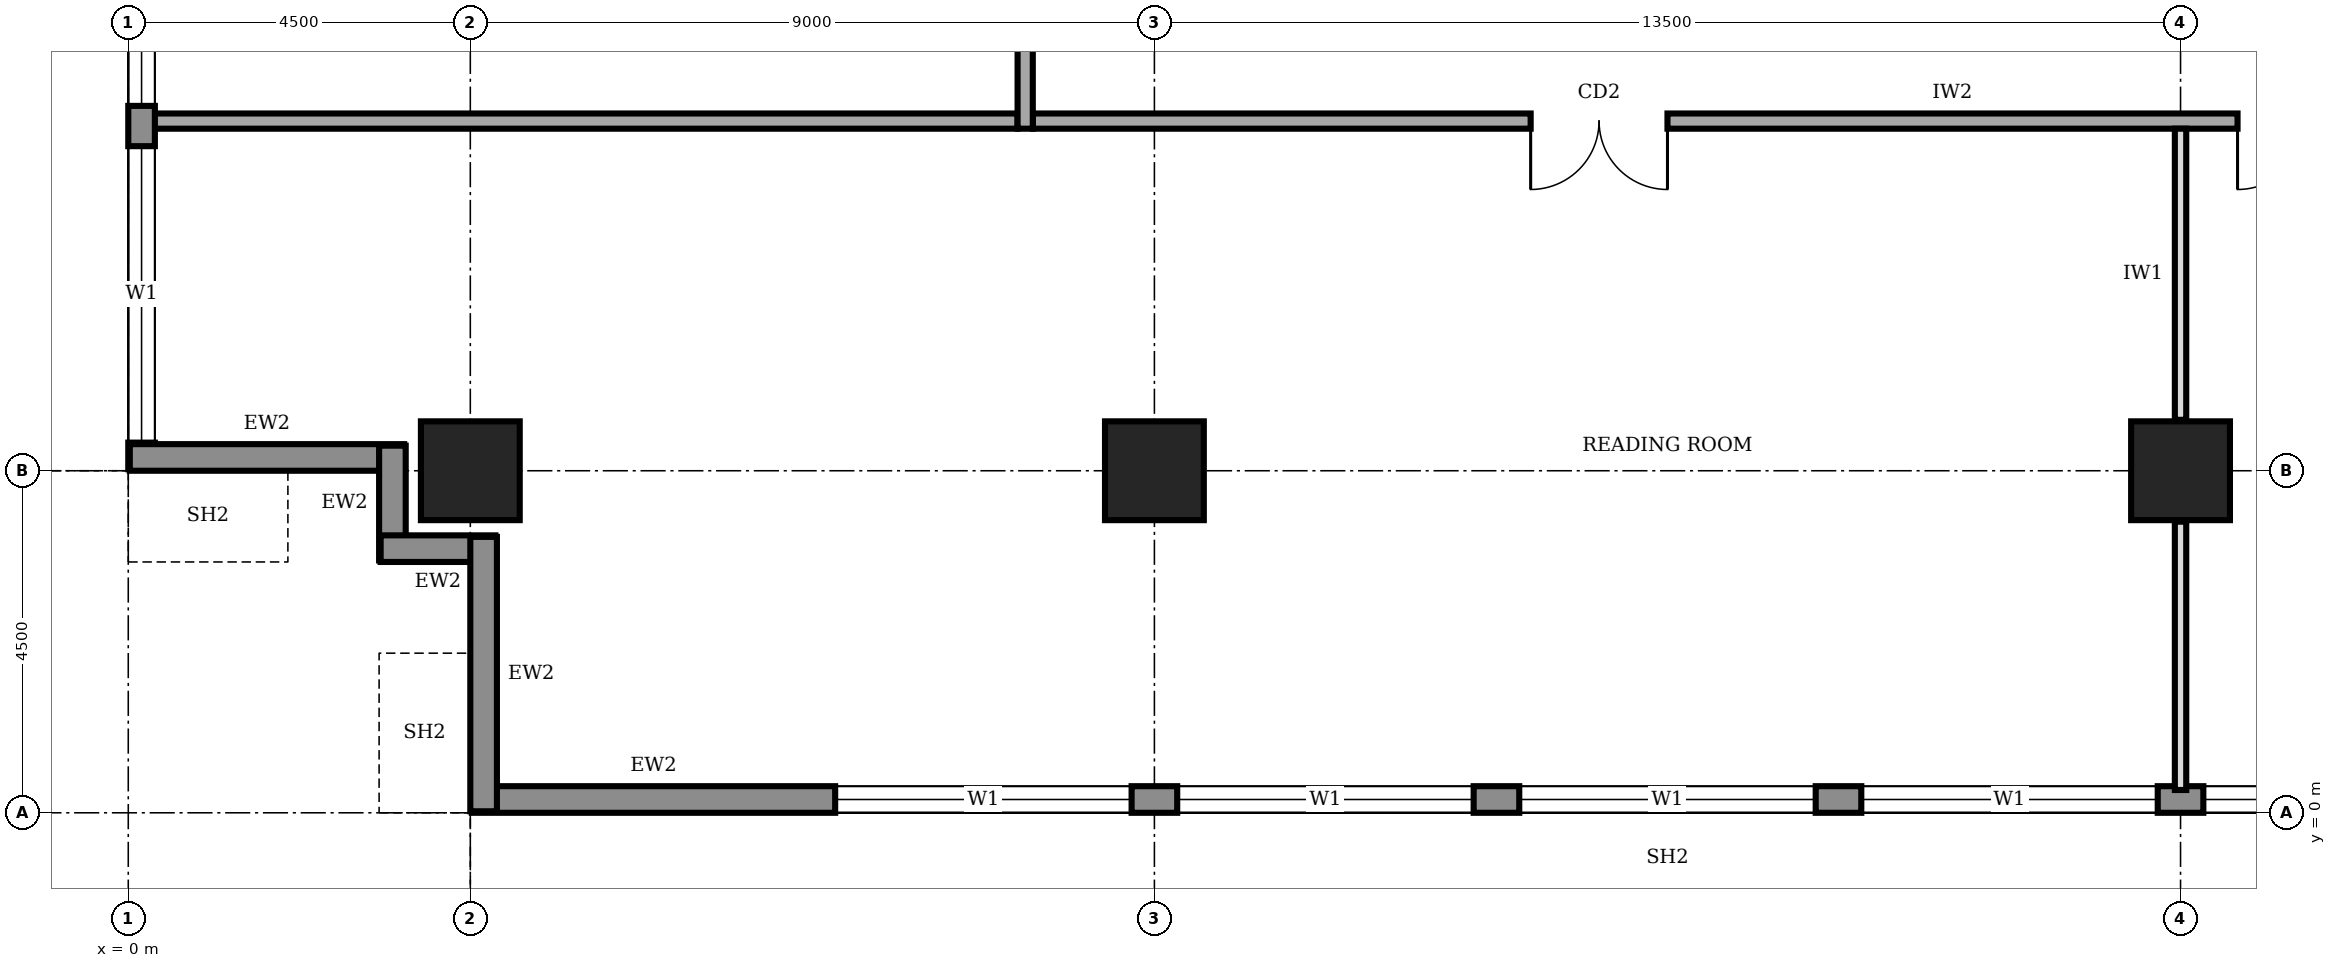
"""IFC4 building model, lengths in metres.
Left out: names, types, materials, properties, quantities, classifications, styles, units other than length and angle.
Written with IfcOpenShell. Run it as: python <this file> out.ifc"""

import sys

from ifc_helpers import new_model, si_unit, direction, frame, frame_2d, origin, origin_2d, place, context, subcontext, project, spatial, rectangle, extrude, element, fill, save


model = new_model("IFC4")
c1 = context("Model", 3, precision=1e-05, world=origin(), true_north=direction((0.0, 1.0)))
c2 = subcontext(c1, "Body", "Model", "MODEL_VIEW")
j1 = project(units=[si_unit("LENGTHUNIT", "METRE"), si_unit("PLANEANGLEUNIT", "RADIAN")], contexts=[c1])
p1 = place(None, origin())
s1 = spatial("IfcSite", under=j1, at=p1, CompositionType="ELEMENT")
p2 = place(p1, origin())
s2 = spatial("IfcBuilding", under=s1, at=p2, CompositionType="ELEMENT")
p3 = place(p2, frame((0.0, 0.0, 285.0)))
s3 = spatial("IfcBuildingStorey", under=s2, at=p3, CompositionType="ELEMENT", Elevation=285.0)
for number, where, z_axis, x_axis in (
    (1, (4.5, 4.5, 0.0), (0.0, 0.0, 1.0), (1.0, 0.0, 0.0)),
    (2, (13.5, 4.5, 0.0), (0.0, 0.0, 1.0), (1.0, 0.0, 0.0)),
    (3, (27.0, 4.5, 0.0), (0.0, 0.0, 1.0), (1.0, 0.0, 0.0)),
):
    element("IfcColumn", number, at=place(p3, frame(where, z_axis=z_axis, x_axis=x_axis)), inside=s3, PredefinedType="COLUMN", context=c2, shape_type="SweptSolid", body=[
        extrude(rectangle(XDim=1.3, YDim=1.3, at=origin_2d()), origin(), (0.0, 0.0, 1.0), 4.0),
    ])
p4 = place(p3, frame((4.52, 0.175, 0.0), z_axis=(0.0, 0.0, 1.0), x_axis=(1.0, 0.0, 0.0)))
e4 = element("IfcWall", 4, at=p4, inside=s3, PredefinedType="STANDARD", context=c2, shape_type="SweptSolid", body=[
    extrude(rectangle(XDim=31.46, YDim=0.35, at=frame_2d((15.73, 0.0))), origin(), (0.0, 0.0, 1.0), 3.75),
])
p5 = place(p4, frame((4.78, 0.0, 0.9)))
e5 = element("IfcOpeningElement", 5, at=p5, cuts=e4, PredefinedType="OPENING", context=c2, shape_type="SweptSolid", body=[
    extrude(rectangle(XDim=3.9, YDim=2.2, at=frame_2d((1.95, 1.1))), frame((0.0, 0.185, 0.0), z_axis=(0.0, -1.0, 0.0), x_axis=(1.0, 0.0, 0.0)), (0.0, 0.0, 1.0), 0.37),
])
p6 = place(p4, frame((9.28, 0.0, 0.9)))
e6 = element("IfcOpeningElement", 6, at=p6, cuts=e4, PredefinedType="OPENING", context=c2, shape_type="SweptSolid", body=[
    extrude(rectangle(XDim=3.9, YDim=2.2, at=frame_2d((1.95, 1.1))), frame((0.0, 0.185, 0.0), z_axis=(0.0, -1.0, 0.0), x_axis=(1.0, 0.0, 0.0)), (0.0, 0.0, 1.0), 0.37),
])
p7 = place(p4, frame((13.78, 0.0, 0.9)))
e7 = element("IfcOpeningElement", 7, at=p7, cuts=e4, PredefinedType="OPENING", context=c2, shape_type="SweptSolid", body=[
    extrude(rectangle(XDim=3.9, YDim=2.2, at=frame_2d((1.95, 1.1))), frame((0.0, 0.185, 0.0), z_axis=(0.0, -1.0, 0.0), x_axis=(1.0, 0.0, 0.0)), (0.0, 0.0, 1.0), 0.37),
])
p8 = place(p4, frame((18.28, 0.0, 0.9)))
e8 = element("IfcOpeningElement", 8, at=p8, cuts=e4, PredefinedType="OPENING", context=c2, shape_type="SweptSolid", body=[
    extrude(rectangle(XDim=3.9, YDim=2.2, at=frame_2d((1.95, 1.1))), frame((0.0, 0.185, 0.0), z_axis=(0.0, -1.0, 0.0), x_axis=(1.0, 0.0, 0.0)), (0.0, 0.0, 1.0), 0.37),
])
p9 = place(p4, frame((22.78, 0.0, 0.9)))
e9 = element("IfcOpeningElement", 9, at=p9, cuts=e4, PredefinedType="OPENING", context=c2, shape_type="SweptSolid", body=[
    extrude(rectangle(XDim=3.9, YDim=2.2, at=frame_2d((1.95, 1.1))), frame((0.0, 0.185, 0.0), z_axis=(0.0, -1.0, 0.0), x_axis=(1.0, 0.0, 0.0)), (0.0, 0.0, 1.0), 0.37),
])
p10 = place(p4, frame((27.21, 0.0, 0.9)))
e10 = element("IfcOpeningElement", 10, at=p10, cuts=e4, PredefinedType="OPENING", context=c2, shape_type="SweptSolid", body=[
    extrude(rectangle(XDim=3.9, YDim=2.2, at=frame_2d((1.95, 1.1))), frame((0.0, 0.185, 0.0), z_axis=(0.0, -1.0, 0.0), x_axis=(1.0, 0.0, 0.0)), (0.0, 0.0, 1.0), 0.37),
])
p11 = place(p3, frame((0.175, 35.98, 0.0), z_axis=(0.0, 0.0, 1.0), x_axis=(0.0, -1.0, 0.0)))
e11 = element("IfcWall", 11, at=p11, inside=s3, PredefinedType="STANDARD", context=c2, shape_type="SweptSolid", body=[
    extrude(rectangle(XDim=31.46, YDim=0.35, at=frame_2d((15.73, 0.0))), origin(), (0.0, 0.0, 1.0), 3.75),
])
p12 = place(p11, frame((27.21, 0.0, 0.9)))
e12 = element("IfcOpeningElement", 12, at=p12, cuts=e11, PredefinedType="OPENING", context=c2, shape_type="SweptSolid", body=[
    extrude(rectangle(XDim=3.9, YDim=2.2, at=frame_2d((1.95, 1.1))), frame((0.0, 0.185, 0.0), z_axis=(0.0, -1.0, 0.0), x_axis=(1.0, 0.0, 0.0)), (0.0, 0.0, 1.0), 0.37),
])
p13 = place(p11, frame((22.78, 0.0, 0.9)))
e13 = element("IfcOpeningElement", 13, at=p13, cuts=e11, PredefinedType="OPENING", context=c2, shape_type="SweptSolid", body=[
    extrude(rectangle(XDim=3.9, YDim=2.2, at=frame_2d((1.95, 1.1))), frame((0.0, 0.185, 0.0), z_axis=(0.0, -1.0, 0.0), x_axis=(1.0, 0.0, 0.0)), (0.0, 0.0, 1.0), 0.37),
])
p14 = place(p11, frame((18.28, 0.0, 0.9)))
e14 = element("IfcOpeningElement", 14, at=p14, cuts=e11, PredefinedType="OPENING", context=c2, shape_type="SweptSolid", body=[
    extrude(rectangle(XDim=3.9, YDim=2.2, at=frame_2d((1.95, 1.1))), frame((0.0, 0.185, 0.0), z_axis=(0.0, -1.0, 0.0), x_axis=(1.0, 0.0, 0.0)), (0.0, 0.0, 1.0), 0.37),
])
p15 = place(p11, frame((13.78, 0.0, 0.9)))
e15 = element("IfcOpeningElement", 15, at=p15, cuts=e11, PredefinedType="OPENING", context=c2, shape_type="SweptSolid", body=[
    extrude(rectangle(XDim=3.9, YDim=2.2, at=frame_2d((1.95, 1.1))), frame((0.0, 0.185, 0.0), z_axis=(0.0, -1.0, 0.0), x_axis=(1.0, 0.0, 0.0)), (0.0, 0.0, 1.0), 0.37),
])
p16 = place(p11, frame((9.28, 0.0, 0.9)))
e16 = element("IfcOpeningElement", 16, at=p16, cuts=e11, PredefinedType="OPENING", context=c2, shape_type="SweptSolid", body=[
    extrude(rectangle(XDim=3.9, YDim=2.2, at=frame_2d((1.95, 1.1))), frame((0.0, 0.185, 0.0), z_axis=(0.0, -1.0, 0.0), x_axis=(1.0, 0.0, 0.0)), (0.0, 0.0, 1.0), 0.37),
])
p17 = place(p11, frame((4.78, 0.0, 0.9)))
e17 = element("IfcOpeningElement", 17, at=p17, cuts=e11, PredefinedType="OPENING", context=c2, shape_type="SweptSolid", body=[
    extrude(rectangle(XDim=3.9, YDim=2.2, at=frame_2d((1.95, 1.1))), frame((0.0, 0.185, 0.0), z_axis=(0.0, -1.0, 0.0), x_axis=(1.0, 0.0, 0.0)), (0.0, 0.0, 1.0), 0.37),
])
p18 = place(p3, frame((0.02, 4.675, 0.0), z_axis=(0.0, 0.0, 1.0), x_axis=(1.0, 0.0, 0.0)))
e18 = element("IfcWall", 18, at=p18, inside=s3, PredefinedType="STANDARD", context=c2, shape_type="SweptSolid", body=[
    extrude(rectangle(XDim=3.61, YDim=0.35, at=frame_2d((1.805, 0.0))), origin(), (0.0, 0.0, 1.0), 2.65),
])
for number, where, z_axis, x_axis in (
    (19, (3.475, 4.83, 0.0), (0.0, 0.0, 1.0), (0.0, -1.0, 0.0)),
    (20, (3.32, 3.475, 0.0), (0.0, 0.0, 1.0), (1.0, 0.0, 0.0)),
):
    element("IfcWall", number, at=place(p3, frame(where, z_axis=z_axis, x_axis=x_axis)), inside=s3, PredefinedType="STANDARD", context=c2, shape_type="SweptSolid", body=[
        extrude(rectangle(XDim=1.51, YDim=0.35, at=frame_2d((0.755, 0.0))), origin(), (0.0, 0.0, 1.0), 3.75),
    ])
p19 = place(p3, frame((4.675, 3.63, 0.0), z_axis=(0.0, 0.0, 1.0), x_axis=(0.0, -1.0, 0.0)))
e21 = element("IfcWall", 21, at=p19, inside=s3, PredefinedType="STANDARD", context=c2, shape_type="SweptSolid", body=[
    extrude(rectangle(XDim=3.61, YDim=0.35, at=frame_2d((1.805, 0.0))), origin(), (0.0, 0.0, 1.0), 2.65),
])
p20 = place(p3, frame((11.9, 9.1, 0.0), z_axis=(0.0, 0.0, 1.0), x_axis=(1.0, 0.0, 0.0)))
e22 = element("IfcWall", 22, at=p20, inside=s3, PredefinedType="SOLIDWALL", context=c2, shape_type="SweptSolid", body=[
    extrude(rectangle(XDim=18.4, YDim=0.2, at=frame_2d((9.2, 0.0))), origin(), (0.0, 0.0, 1.0), 3.75),
])
p21 = place(p20, frame((6.55, 0.0, 0.0)))
e23 = element("IfcOpeningElement", 23, at=p21, cuts=e22, PredefinedType="OPENING", context=c2, shape_type="SweptSolid", body=[
    extrude(rectangle(XDim=1.8, YDim=2.1, at=frame_2d((0.9, 1.05))), frame((0.0, 0.11, 0.0), z_axis=(0.0, -1.0, 0.0), x_axis=(1.0, 0.0, 0.0)), (0.0, 0.0, 1.0), 0.22),
])
p22 = place(p20, frame((15.85, 0.0, 0.0)))
e24 = element("IfcOpeningElement", 24, at=p22, cuts=e22, PredefinedType="OPENING", context=c2, shape_type="SweptSolid", body=[
    extrude(rectangle(XDim=1.8, YDim=2.1, at=frame_2d((0.9, 1.05))), frame((0.0, 0.11, 0.0), z_axis=(0.0, -1.0, 0.0), x_axis=(1.0, 0.0, 0.0)), (0.0, 0.0, 1.0), 0.22),
])
p23 = place(p3, frame((11.8, 31.3, 0.0), z_axis=(0.0, 0.0, 1.0), x_axis=(0.0, -1.0, 0.0)))
e25 = element("IfcWall", 25, at=p23, inside=s3, PredefinedType="SOLIDWALL", context=c2, shape_type="SweptSolid", body=[
    extrude(rectangle(XDim=22.3, YDim=0.2, at=frame_2d((11.15, 0.0))), origin(), (0.0, 0.0, 1.0), 3.75),
])
p24 = place(p23, frame((19.55, 0.0, 0.0)))
e26 = element("IfcOpeningElement", 26, at=p24, cuts=e25, PredefinedType="OPENING", context=c2, shape_type="SweptSolid", body=[
    extrude(rectangle(XDim=1.0, YDim=2.1, at=frame_2d((0.5, 1.05))), frame((0.0, 0.11, 0.0), z_axis=(0.0, -1.0, 0.0), x_axis=(1.0, 0.0, 0.0)), (0.0, 0.0, 1.0), 0.22),
])
p25 = place(p23, frame((15.65, 0.0, 0.0)))
e27 = element("IfcOpeningElement", 27, at=p25, cuts=e25, PredefinedType="OPENING", context=c2, shape_type="SweptSolid", body=[
    extrude(rectangle(XDim=0.9, YDim=2.1, at=frame_2d((0.45, 1.05))), frame((0.0, 0.11, 0.0), z_axis=(0.0, -1.0, 0.0), x_axis=(1.0, 0.0, 0.0)), (0.0, 0.0, 1.0), 0.22),
])
p26 = place(p23, frame((10.85, 0.0, 0.0)))
e28 = element("IfcOpeningElement", 28, at=p26, cuts=e25, PredefinedType="OPENING", context=c2, shape_type="SweptSolid", body=[
    extrude(rectangle(XDim=0.9, YDim=2.1, at=frame_2d((0.45, 1.05))), frame((0.0, 0.11, 0.0), z_axis=(0.0, -1.0, 0.0), x_axis=(1.0, 0.0, 0.0)), (0.0, 0.0, 1.0), 0.22),
])
p27 = place(p23, frame((7.8, 0.0, 0.0)))
e29 = element("IfcOpeningElement", 29, at=p27, cuts=e25, PredefinedType="OPENING", context=c2, shape_type="SweptSolid", body=[
    extrude(rectangle(XDim=0.9, YDim=2.1, at=frame_2d((0.45, 1.05))), frame((0.0, 0.11, 0.0), z_axis=(0.0, -1.0, 0.0), x_axis=(1.0, 0.0, 0.0)), (0.0, 0.0, 1.0), 0.22),
])
p28 = place(p23, frame((4.8, 0.0, 0.0)))
e30 = element("IfcOpeningElement", 30, at=p28, cuts=e25, PredefinedType="OPENING", context=c2, shape_type="SweptSolid", body=[
    extrude(rectangle(XDim=1.0, YDim=2.1, at=frame_2d((0.5, 1.05))), frame((0.0, 0.11, 0.0), z_axis=(0.0, -1.0, 0.0), x_axis=(1.0, 0.0, 0.0)), (0.0, 0.0, 1.0), 0.22),
])
p29 = place(p23, frame((12.9, 0.0, 0.0)))
e31 = element("IfcOpeningElement", 31, at=p29, cuts=e25, PredefinedType="OPENING", context=c2, shape_type="SweptSolid", body=[
    extrude(rectangle(XDim=1.0, YDim=2.1, at=frame_2d((0.5, 1.05))), frame((0.0, 0.11, 0.0), z_axis=(0.0, -1.0, 0.0), x_axis=(1.0, 0.0, 0.0)), (0.0, 0.0, 1.0), 0.22),
])
p30 = place(p23, frame((1.55, 0.0, 0.0)))
e32 = element("IfcOpeningElement", 32, at=p30, cuts=e25, PredefinedType="OPENING", context=c2, shape_type="SweptSolid", body=[
    extrude(rectangle(XDim=1.0, YDim=2.1, at=frame_2d((0.5, 1.05))), frame((0.0, 0.11, 0.0), z_axis=(0.0, -1.0, 0.0), x_axis=(1.0, 0.0, 0.0)), (0.0, 0.0, 1.0), 0.22),
])
p31 = place(p3, frame((0.3, 9.1, 0.0), z_axis=(0.0, 0.0, 1.0), x_axis=(1.0, 0.0, 0.0)))
e33 = element("IfcWall", 33, at=p31, inside=s3, PredefinedType="SOLIDWALL", context=c2, shape_type="SweptSolid", body=[
    extrude(rectangle(XDim=11.4, YDim=0.2, at=frame_2d((5.7, 0.0))), origin(), (0.0, 0.0, 1.0), 3.75),
])
p32 = place(p3, frame((27.0, 0.3, 0.0), z_axis=(0.0, 0.0, 1.0), x_axis=(0.0, 1.0, 0.0)))
e34 = element("IfcWall", 34, at=p32, inside=s3, PredefinedType="PARTITIONING", context=c2, shape_type="SweptSolid", body=[
    extrude(rectangle(XDim=3.53, YDim=0.15, at=frame_2d((1.765, 0.0))), origin(), (0.0, 0.0, 1.0), 2.65),
])
p33 = place(p3, frame((27.0, 5.17, 0.0), z_axis=(0.0, 0.0, 1.0), x_axis=(0.0, 1.0, 0.0)))
e35 = element("IfcWall", 35, at=p33, inside=s3, PredefinedType="PARTITIONING", context=c2, shape_type="SweptSolid", body=[
    extrude(rectangle(XDim=3.83, YDim=0.15, at=frame_2d((1.915, 0.0))), origin(), (0.0, 0.0, 1.0), 2.85),
])
p34 = place(p5, origin())
e36 = element("IfcWindow", 36, at=p34, inside=s3, PartitioningType="SINGLE_PANEL", PredefinedType="WINDOW", context=c2, shape_type="SweptSolid", body=[
    extrude(rectangle(XDim=3.9, YDim=2.2, at=frame_2d((1.95, 1.1))), frame((0.0, 0.03, 0.0), z_axis=(0.0, -1.0, 0.0), x_axis=(1.0, 0.0, 0.0)), (0.0, 0.0, 1.0), 0.06),
])
fill(e5, e36)
p35 = place(p6, origin())
e37 = element("IfcWindow", 37, at=p35, inside=s3, PartitioningType="SINGLE_PANEL", PredefinedType="WINDOW", context=c2, shape_type="SweptSolid", body=[
    extrude(rectangle(XDim=3.9, YDim=2.2, at=frame_2d((1.95, 1.1))), frame((0.0, 0.03, 0.0), z_axis=(0.0, -1.0, 0.0), x_axis=(1.0, 0.0, 0.0)), (0.0, 0.0, 1.0), 0.06),
])
fill(e6, e37)
p36 = place(p7, origin())
e38 = element("IfcWindow", 38, at=p36, inside=s3, PartitioningType="SINGLE_PANEL", PredefinedType="WINDOW", context=c2, shape_type="SweptSolid", body=[
    extrude(rectangle(XDim=3.9, YDim=2.2, at=frame_2d((1.95, 1.1))), frame((0.0, 0.03, 0.0), z_axis=(0.0, -1.0, 0.0), x_axis=(1.0, 0.0, 0.0)), (0.0, 0.0, 1.0), 0.06),
])
fill(e7, e38)
p37 = place(p8, origin())
e39 = element("IfcWindow", 39, at=p37, inside=s3, PartitioningType="SINGLE_PANEL", PredefinedType="WINDOW", context=c2, shape_type="SweptSolid", body=[
    extrude(rectangle(XDim=3.9, YDim=2.2, at=frame_2d((1.95, 1.1))), frame((0.0, 0.03, 0.0), z_axis=(0.0, -1.0, 0.0), x_axis=(1.0, 0.0, 0.0)), (0.0, 0.0, 1.0), 0.06),
])
fill(e8, e39)
p38 = place(p9, origin())
e40 = element("IfcWindow", 40, at=p38, inside=s3, PartitioningType="SINGLE_PANEL", PredefinedType="WINDOW", context=c2, shape_type="SweptSolid", body=[
    extrude(rectangle(XDim=3.9, YDim=2.2, at=frame_2d((1.95, 1.1))), frame((0.0, 0.03, 0.0), z_axis=(0.0, -1.0, 0.0), x_axis=(1.0, 0.0, 0.0)), (0.0, 0.0, 1.0), 0.06),
])
fill(e9, e40)
p39 = place(p12, origin())
e41 = element("IfcWindow", 41, at=p39, inside=s3, PartitioningType="SINGLE_PANEL", PredefinedType="WINDOW", context=c2, shape_type="SweptSolid", body=[
    extrude(rectangle(XDim=3.9, YDim=2.2, at=frame_2d((1.95, 1.1))), frame((0.0, 0.03, 0.0), z_axis=(0.0, -1.0, 0.0), x_axis=(1.0, 0.0, 0.0)), (0.0, 0.0, 1.0), 0.06),
])
fill(e12, e41)
p40 = place(p13, origin())
e42 = element("IfcWindow", 42, at=p40, inside=s3, PartitioningType="SINGLE_PANEL", PredefinedType="WINDOW", context=c2, shape_type="SweptSolid", body=[
    extrude(rectangle(XDim=3.9, YDim=2.2, at=frame_2d((1.95, 1.1))), frame((0.0, 0.03, 0.0), z_axis=(0.0, -1.0, 0.0), x_axis=(1.0, 0.0, 0.0)), (0.0, 0.0, 1.0), 0.06),
])
fill(e13, e42)
p41 = place(p21, frame((1.8, 0.0, 0.0), z_axis=(0.0, 0.0, 1.0), x_axis=(-1.0, 0.0, 0.0)))
e43 = element("IfcDoor", 43, at=p41, inside=s3, OperationType="DOUBLE_DOOR_SINGLE_SWING", PredefinedType="DOOR", context=c2, shape_type="SweptSolid", body=[
    extrude(rectangle(XDim=1.8, YDim=2.1, at=frame_2d((0.9, 1.05))), frame((0.0, 0.025, 0.0), z_axis=(0.0, -1.0, 0.0), x_axis=(1.0, 0.0, 0.0)), (0.0, 0.0, 1.0), 0.05),
])
fill(e23, e43)
p42 = place(p22, frame((1.8, 0.0, 0.0), z_axis=(0.0, 0.0, 1.0), x_axis=(-1.0, 0.0, 0.0)))
e44 = element("IfcDoor", 44, at=p42, inside=s3, OperationType="DOUBLE_DOOR_SINGLE_SWING", PredefinedType="DOOR", context=c2, shape_type="SweptSolid", body=[
    extrude(rectangle(XDim=1.8, YDim=2.1, at=frame_2d((0.9, 1.05))), frame((0.0, 0.025, 0.0), z_axis=(0.0, -1.0, 0.0), x_axis=(1.0, 0.0, 0.0)), (0.0, 0.0, 1.0), 0.05),
])
fill(e24, e44)
save(model, sys.argv[1])
